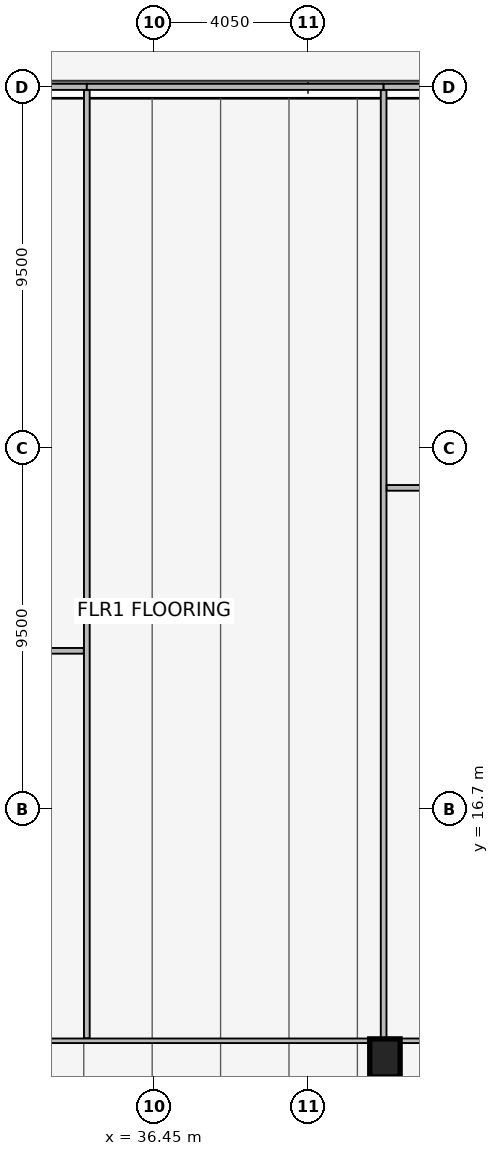
"""IFC4 building model, lengths in metres.
Left out: names, types, materials, properties, quantities, classifications, styles, units other than length and angle.
Written with IfcOpenShell. Run it as: python <this file> out.ifc"""

import sys

from ifc_helpers import new_model, si_unit, direction, frame, frame_2d, origin, origin_2d, place, context, subcontext, project, spatial, rectangle, hollow_rectangle, extrude, element, fill, save


model = new_model("IFC4")
c1 = context("Model", 3, precision=1e-05, world=origin(), true_north=direction((0.0, 1.0)))
c2 = subcontext(c1, "Body", "Model", "MODEL_VIEW")
j1 = project(units=[si_unit("LENGTHUNIT", "METRE"), si_unit("PLANEANGLEUNIT", "RADIAN")], contexts=[c1])
p1 = place(None, origin())
s1 = spatial("IfcSite", under=j1, at=p1, CompositionType="ELEMENT")
p2 = place(p1, origin())
s2 = spatial("IfcBuilding", under=s1, at=p2, CompositionType="ELEMENT")
p3 = place(p2, frame((0.0, 0.0, 61.8)))
s3 = spatial("IfcBuildingStorey", under=s2, at=p3, CompositionType="ELEMENT", Elevation=61.8)
p4 = place(p3, frame((42.525, 10.15, 0.0), z_axis=(0.0, 0.0, 1.0), x_axis=(1.0, 0.0, 0.0)))
e1 = element("IfcColumn", 1, at=p4, inside=s3, PredefinedType="COLUMN", context=c2, shape_type="SweptSolid", body=[
    extrude(hollow_rectangle(XDim=0.8, YDim=1.0, WallThickness=0.055, at=origin_2d()), origin(), (0.0, 0.0, 1.0), 4.0),
])
p5 = place(p3, frame((21.664, 35.7, 0.0), z_axis=(0.0, 0.0, 1.0), x_axis=(1.0, 0.0, 0.0)))
e2 = element("IfcWall", 2, at=p5, inside=s3, PredefinedType="PARTITIONING", context=c2, shape_type="SweptSolid", body=[
    extrude(rectangle(XDim=13.017, YDim=0.16, at=frame_2d((6.508, 0.0))), origin(), (0.0, 0.0, 1.0), 3.01),
])
p6 = place(p5, frame((5.717, 0.0, 0.0)))
e3 = element("IfcOpeningElement", 3, at=p6, cuts=e2, PredefinedType="OPENING", context=c2, shape_type="SweptSolid", body=[
    extrude(rectangle(XDim=1.0, YDim=2.05, at=frame_2d((0.5, 1.025))), frame((0.0, 0.09, 0.0), z_axis=(0.0, -1.0, 0.0), x_axis=(1.0, 0.0, 0.0)), (0.0, 0.0, 1.0), 0.18),
])
p7 = place(p3, frame((21.744, 20.861, 0.0), z_axis=(0.0, 0.0, 1.0), x_axis=(1.0, 0.0, 0.0)))
e4 = element("IfcWall", 4, at=p7, inside=s3, PredefinedType="PARTITIONING", context=c2, shape_type="SweptSolid", body=[
    extrude(rectangle(XDim=12.857, YDim=0.15, at=frame_2d((6.428, 0.0))), origin(), (0.0, 0.0, 1.0), 3.01),
])
p8 = place(p7, frame((5.858, 0.0, 0.0)))
e5 = element("IfcOpeningElement", 5, at=p8, cuts=e4, PredefinedType="OPENING", context=c2, shape_type="SweptSolid", body=[
    extrude(rectangle(XDim=0.9, YDim=2.05, at=frame_2d((0.45, 1.025))), frame((0.0, 0.085, 0.0), z_axis=(0.0, -1.0, 0.0), x_axis=(1.0, 0.0, 0.0)), (0.0, 0.0, 1.0), 0.17),
])
p9 = place(p3, frame((34.68, 35.7, 0.0), z_axis=(0.0, 0.0, 1.0), x_axis=(1.0, 0.0, 0.0)))
e6 = element("IfcWall", 6, at=p9, inside=s3, PredefinedType="PARTITIONING", context=c2, shape_type="SweptSolid", body=[
    extrude(rectangle(XDim=7.81, YDim=0.16, at=frame_2d((3.905, 0.0))), origin(), (0.0, 0.0, 1.0), 3.01),
])
p10 = place(p9, frame((3.53, 0.0, 0.0)))
e7 = element("IfcOpeningElement", 7, at=p10, cuts=e6, PredefinedType="OPENING", context=c2, shape_type="SweptSolid", body=[
    extrude(rectangle(XDim=1.0, YDim=2.05, at=frame_2d((0.5, 1.025))), frame((0.0, 0.09, 0.0), z_axis=(0.0, -1.0, 0.0), x_axis=(1.0, 0.0, 0.0)), (0.0, 0.0, 1.0), 0.18),
])
p11 = place(p3, frame((34.68, 10.665, 0.0), z_axis=(0.0, 0.0, 1.0), x_axis=(0.0, 1.0, 0.0)))
e8 = element("IfcWall", 8, at=p11, inside=s3, PredefinedType="PARTITIONING", context=c2, shape_type="SweptSolid", body=[
    extrude(rectangle(XDim=24.95, YDim=0.15, at=frame_2d((12.475, 0.0))), origin(), (0.0, 0.0, 1.0), 3.21),
])
p12 = place(p3, frame((42.49, 35.7, 0.0), z_axis=(0.0, 0.0, 1.0), x_axis=(1.0, 0.0, 0.0)))
e9 = element("IfcWall", 9, at=p12, inside=s3, PredefinedType="PARTITIONING", context=c2, shape_type="SweptSolid", body=[
    extrude(rectangle(XDim=8.163, YDim=0.16, at=frame_2d((4.082, 0.0))), origin(), (0.0, 0.0, 1.0), 3.01),
])
p13 = place(p12, frame((3.678, 0.0, 0.0)))
e10 = element("IfcOpeningElement", 10, at=p13, cuts=e9, PredefinedType="OPENING", context=c2, shape_type="SweptSolid", body=[
    extrude(rectangle(XDim=1.0, YDim=2.05, at=frame_2d((0.5, 1.025))), frame((0.0, 0.09, 0.0), z_axis=(0.0, -1.0, 0.0), x_axis=(1.0, 0.0, 0.0)), (0.0, 0.0, 1.0), 0.18),
])
p14 = place(p3, frame((42.49, 10.665, 0.0), z_axis=(0.0, 0.0, 1.0), x_axis=(0.0, 1.0, 0.0)))
e11 = element("IfcWall", 11, at=p14, inside=s3, PredefinedType="PARTITIONING", context=c2, shape_type="SweptSolid", body=[
    extrude(rectangle(XDim=24.95, YDim=0.15, at=frame_2d((12.475, 0.0))), origin(), (0.0, 0.0, 1.0), 3.01),
])
p15 = place(p3, frame((42.571, 25.148, 0.0), z_axis=(0.0, 0.0, 1.0), x_axis=(1.0, 0.0, 0.0)))
e12 = element("IfcWall", 12, at=p15, inside=s3, PredefinedType="PARTITIONING", context=c2, shape_type="SweptSolid", body=[
    extrude(rectangle(XDim=8.003, YDim=0.15, at=frame_2d((4.001, 0.0))), origin(), (0.0, 0.0, 1.0), 3.01),
])
p16 = place(p15, frame((3.673, 0.0, 0.0)))
e13 = element("IfcOpeningElement", 13, at=p16, cuts=e12, PredefinedType="OPENING", context=c2, shape_type="SweptSolid", body=[
    extrude(rectangle(XDim=0.9, YDim=2.05, at=frame_2d((0.45, 1.025))), frame((0.0, 0.085, 0.0), z_axis=(0.0, -1.0, 0.0), x_axis=(1.0, 0.0, 0.0)), (0.0, 0.0, 1.0), 0.17),
])
p17 = place(p3, frame((2.095, 10.6, 0.0), z_axis=(0.0, 0.0, 1.0), x_axis=(1.0, 0.0, 0.0)))
e14 = element("IfcWall", 14, at=p17, inside=s3, PredefinedType="PARTITIONING", context=c2, shape_type="SweptSolid", body=[
    extrude(rectangle(XDim=68.71, YDim=0.12, at=frame_2d((34.355, 0.0))), origin(), (0.0, 0.0, 1.0), 3.01),
])
p18 = place(p10, origin())
e15 = element("IfcDoor", 15, at=p18, inside=s3, OperationType="SINGLE_SWING_RIGHT", PredefinedType="DOOR", context=c2, shape_type="SweptSolid", body=[
    extrude(rectangle(XDim=1.0, YDim=2.05, at=frame_2d((0.5, 1.025))), frame((0.0, 0.025, 0.0), z_axis=(0.0, -1.0, 0.0), x_axis=(1.0, 0.0, 0.0)), (0.0, 0.0, 1.0), 0.05),
])
fill(e7, e15)
save(model, sys.argv[1])
